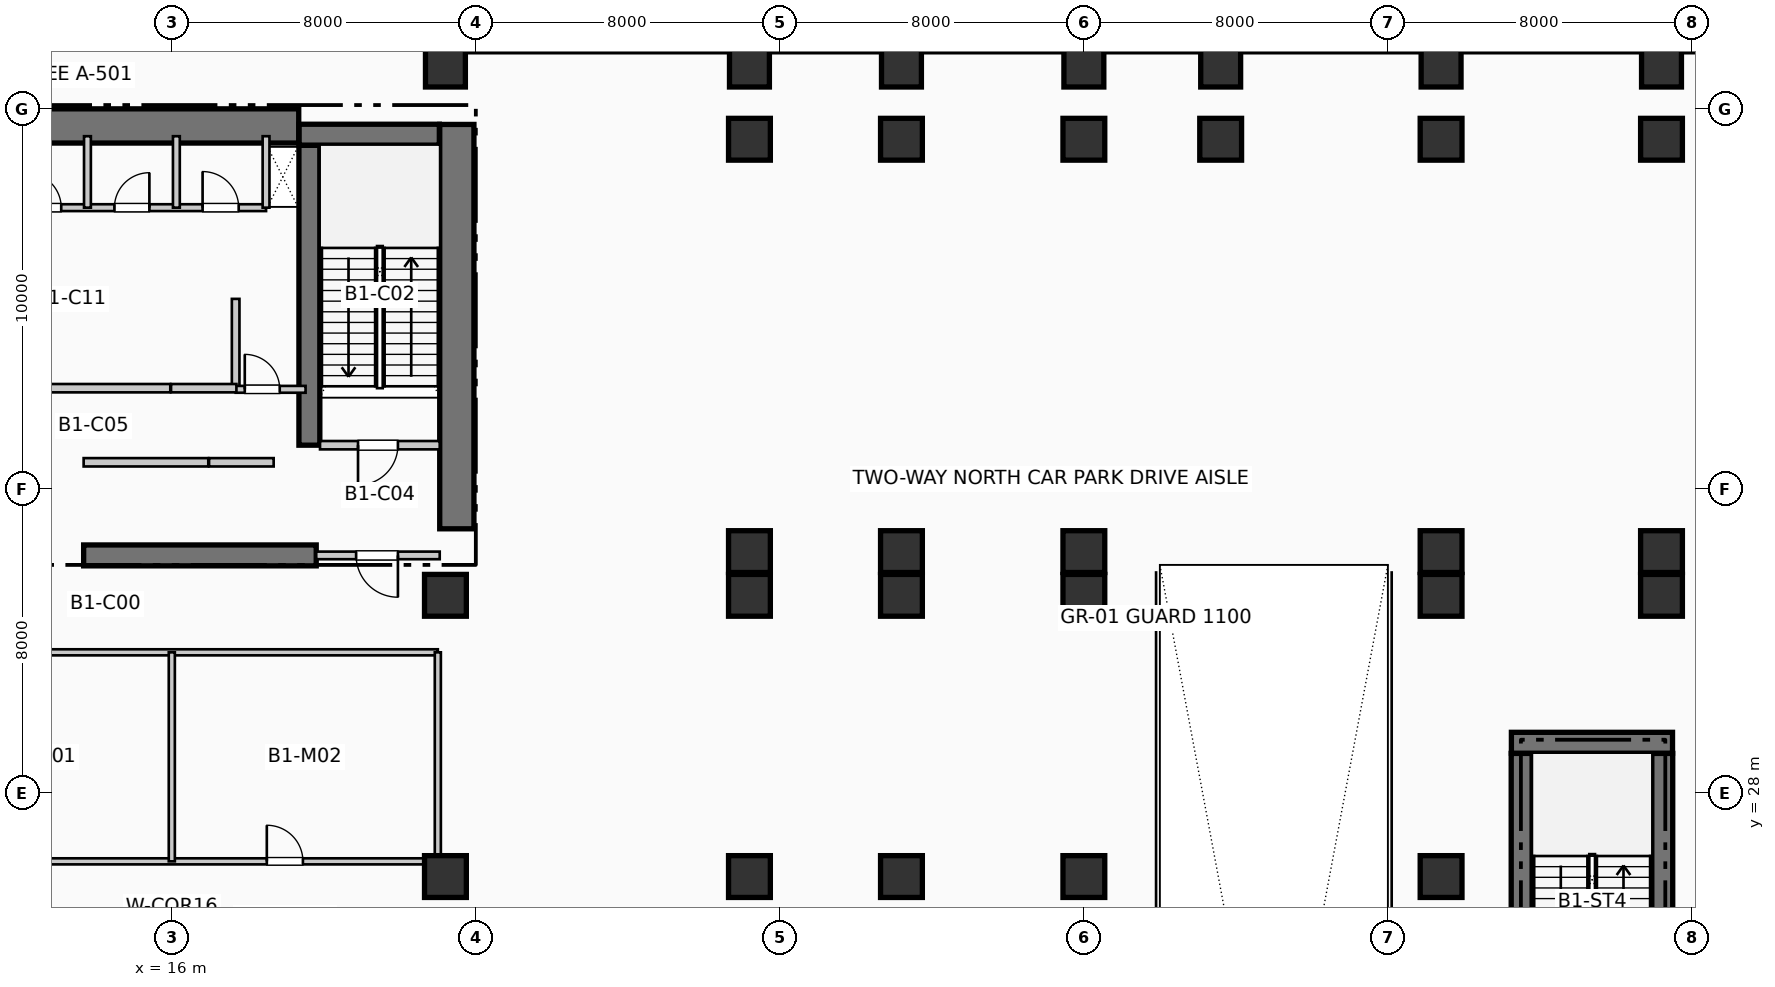
"""IFC4 building model, lengths in metres.
Left out: names, types, materials, properties, quantities, classifications, styles, units other than length and angle.
Written with IfcOpenShell. Run it as: python <this file> out.ifc"""

import sys

from ifc_helpers import new_model, si_unit, direction, frame, frame_2d, origin, origin_2d, place, context, subcontext, project, spatial, rectangle, extrude, element, fill, save


model = new_model("IFC4")
c1 = context("Model", 3, precision=1e-05, world=origin(), true_north=direction((0.0, 1.0)))
c2 = subcontext(c1, "Body", "Model", "MODEL_VIEW")
j1 = project(units=[si_unit("LENGTHUNIT", "METRE"), si_unit("PLANEANGLEUNIT", "RADIAN")], contexts=[c1])
p1 = place(None, origin())
s1 = spatial("IfcSite", under=j1, at=p1, CompositionType="ELEMENT")
p2 = place(p1, origin())
s2 = spatial("IfcBuilding", under=s1, at=p2, CompositionType="ELEMENT")
p3 = place(p2, frame((0.0, 0.0, -4.62)))
s3 = spatial("IfcBuildingStorey", under=s2, at=p3, CompositionType="ELEMENT", Elevation=-4.62)
p4 = place(p3, frame((5.36, 45.55, 0.0), z_axis=(0.0, 0.0, 1.0), x_axis=(1.0, 0.0, 0.0)))
e1 = element("IfcWall", 1, at=p4, inside=s3, PredefinedType="SHEAR", context=c2, shape_type="SweptSolid", body=[
    extrude(rectangle(XDim=13.98, YDim=0.9, at=frame_2d((6.99, 0.0))), origin(), (0.0, 0.0, 1.0), 4.62),
])
p5 = place(p3, frame((23.5, 34.95, 0.0), z_axis=(0.0, 0.0, 1.0), x_axis=(0.0, 1.0, 0.0)))
e2 = element("IfcWall", 2, at=p5, inside=s3, PredefinedType="SHEAR", context=c2, shape_type="SweptSolid", body=[
    extrude(rectangle(XDim=10.64, YDim=0.9, at=frame_2d((5.32, 0.0))), origin(), (0.0, 0.0, 1.0), 4.62),
])
p6 = place(p3, frame((13.68, 34.25, 0.0), z_axis=(0.0, 0.0, 1.0), x_axis=(1.0, 0.0, 0.0)))
e3 = element("IfcWall", 3, at=p6, inside=s3, PredefinedType="SHEAR", context=c2, shape_type="SweptSolid", body=[
    extrude(rectangle(XDim=6.12, YDim=0.55, at=frame_2d((3.06, 0.0))), origin(), (0.0, 0.0, 1.0), 4.62),
])
p7 = place(p3, frame((19.62, 37.15, 0.0), z_axis=(0.0, 0.0, 1.0), x_axis=(0.0, 1.0, 0.0)))
e4 = element("IfcWall", 4, at=p7, inside=s3, PredefinedType="SHEAR", context=c2, shape_type="SweptSolid", body=[
    extrude(rectangle(XDim=7.89, YDim=0.55, at=frame_2d((3.945, 0.0))), origin(), (0.0, 0.0, 1.0), 4.62),
])
p8 = place(p3, frame((19.35, 45.32, 0.0), z_axis=(0.0, 0.0, 1.0), x_axis=(1.0, 0.0, 0.0)))
e5 = element("IfcWall", 5, at=p8, inside=s3, PredefinedType="SHEAR", context=c2, shape_type="SweptSolid", body=[
    extrude(rectangle(XDim=3.69, YDim=0.55, at=frame_2d((1.845, 0.0))), origin(), (0.0, 0.0, 1.0), 4.62),
])
for number, where, z_axis, x_axis in (
    (6, (51.52, 21.15, 0.0), (0.0, 0.0, 1.0), (0.0, 1.0, 0.0)),
    (7, (55.22, 21.15, 0.0), (0.0, 0.0, 1.0), (0.0, 1.0, 0.0)),
):
    element("IfcWall", number, at=place(p3, frame(where, z_axis=z_axis, x_axis=x_axis)), inside=s3, PredefinedType="SHEAR", context=c2, shape_type="SweptSolid", body=[
        extrude(rectangle(XDim=7.89, YDim=0.55, at=frame_2d((3.945, 0.0))), origin(), (0.0, 0.0, 1.0), 4.62),
    ])
p9 = place(p3, frame((51.25, 29.32, 0.0), z_axis=(0.0, 0.0, 1.0), x_axis=(1.0, 0.0, 0.0)))
e8 = element("IfcWall", 8, at=p9, inside=s3, PredefinedType="SHEAR", context=c2, shape_type="SweptSolid", body=[
    extrude(rectangle(XDim=4.24, YDim=0.55, at=frame_2d((2.12, 0.0))), origin(), (0.0, 0.0, 1.0), 4.62),
])
for number, where, z_axis, x_axis in (
    (9, (23.2, 25.8, 0.0), (0.0, 0.0, 1.0), (1.0, 0.0, 0.0)),
    (10, (23.2, 33.2, 0.0), (0.0, 0.0, 1.0), (1.0, 0.0, 0.0)),
):
    element("IfcColumn", number, at=place(p3, frame(where, z_axis=z_axis, x_axis=x_axis)), inside=s3, PredefinedType="COLUMN", context=c2, shape_type="SweptSolid", body=[
        extrude(rectangle(XDim=1.1, YDim=1.1, at=origin_2d()), origin(), (0.0, 0.0, 1.0), 4.62),
    ])
p10 = place(p3, frame((23.2, 47.1, 0.0), z_axis=(0.0, 0.0, 1.0), x_axis=(1.0, 0.0, 0.0)))
e11 = element("IfcColumn", 11, at=p10, inside=s3, PredefinedType="COLUMN", context=c2, shape_type="SweptSolid", body=[
    extrude(rectangle(XDim=1.05, YDim=1.05, at=origin_2d()), origin(), (0.0, 0.0, 1.0), 4.62),
])
for number, where, z_axis, x_axis in (
    (12, (31.2, 25.8, 0.0), (0.0, 0.0, 1.0), (1.0, 0.0, 0.0)),
    (13, (31.2, 33.2, 0.0), (0.0, 0.0, 1.0), (1.0, 0.0, 0.0)),
    (14, (31.2, 34.35, 0.0), (0.0, 0.0, 1.0), (1.0, 0.0, 0.0)),
    (15, (31.2, 45.2, 0.0), (0.0, 0.0, 1.0), (1.0, 0.0, 0.0)),
):
    element("IfcColumn", number, at=place(p3, frame(where, z_axis=z_axis, x_axis=x_axis)), inside=s3, PredefinedType="COLUMN", context=c2, shape_type="SweptSolid", body=[
        extrude(rectangle(XDim=1.1, YDim=1.1, at=origin_2d()), origin(), (0.0, 0.0, 1.0), 4.62),
    ])
p11 = place(p3, frame((31.2, 47.1, 0.0), z_axis=(0.0, 0.0, 1.0), x_axis=(1.0, 0.0, 0.0)))
e16 = element("IfcColumn", 16, at=p11, inside=s3, PredefinedType="COLUMN", context=c2, shape_type="SweptSolid", body=[
    extrude(rectangle(XDim=1.05, YDim=1.05, at=origin_2d()), origin(), (0.0, 0.0, 1.0), 4.62),
])
for number, where, z_axis, x_axis in (
    (17, (35.2, 25.8, 0.0), (0.0, 0.0, 1.0), (1.0, 0.0, 0.0)),
    (18, (35.2, 33.2, 0.0), (0.0, 0.0, 1.0), (1.0, 0.0, 0.0)),
    (19, (35.2, 34.35, 0.0), (0.0, 0.0, 1.0), (1.0, 0.0, 0.0)),
    (20, (35.2, 45.2, 0.0), (0.0, 0.0, 1.0), (1.0, 0.0, 0.0)),
):
    element("IfcColumn", number, at=place(p3, frame(where, z_axis=z_axis, x_axis=x_axis)), inside=s3, PredefinedType="COLUMN", context=c2, shape_type="SweptSolid", body=[
        extrude(rectangle(XDim=1.1, YDim=1.1, at=origin_2d()), origin(), (0.0, 0.0, 1.0), 4.62),
    ])
p12 = place(p3, frame((35.2, 47.1, 0.0), z_axis=(0.0, 0.0, 1.0), x_axis=(1.0, 0.0, 0.0)))
e21 = element("IfcColumn", 21, at=p12, inside=s3, PredefinedType="COLUMN", context=c2, shape_type="SweptSolid", body=[
    extrude(rectangle(XDim=1.05, YDim=1.05, at=origin_2d()), origin(), (0.0, 0.0, 1.0), 4.62),
])
for number, where, z_axis, x_axis in (
    (22, (40.0, 25.8, 0.0), (0.0, 0.0, 1.0), (1.0, 0.0, 0.0)),
    (23, (40.0, 33.2, 0.0), (0.0, 0.0, 1.0), (1.0, 0.0, 0.0)),
    (24, (40.0, 34.35, 0.0), (0.0, 0.0, 1.0), (1.0, 0.0, 0.0)),
    (25, (40.0, 45.2, 0.0), (0.0, 0.0, 1.0), (1.0, 0.0, 0.0)),
):
    element("IfcColumn", number, at=place(p3, frame(where, z_axis=z_axis, x_axis=x_axis)), inside=s3, PredefinedType="COLUMN", context=c2, shape_type="SweptSolid", body=[
        extrude(rectangle(XDim=1.1, YDim=1.1, at=origin_2d()), origin(), (0.0, 0.0, 1.0), 4.62),
    ])
p13 = place(p3, frame((40.0, 47.1, 0.0), z_axis=(0.0, 0.0, 1.0), x_axis=(1.0, 0.0, 0.0)))
e26 = element("IfcColumn", 26, at=p13, inside=s3, PredefinedType="COLUMN", context=c2, shape_type="SweptSolid", body=[
    extrude(rectangle(XDim=1.05, YDim=1.05, at=origin_2d()), origin(), (0.0, 0.0, 1.0), 4.62),
])
p14 = place(p3, frame((43.6, 45.2, 0.0), z_axis=(0.0, 0.0, 1.0), x_axis=(1.0, 0.0, 0.0)))
e27 = element("IfcColumn", 27, at=p14, inside=s3, PredefinedType="COLUMN", context=c2, shape_type="SweptSolid", body=[
    extrude(rectangle(XDim=1.1, YDim=1.1, at=origin_2d()), origin(), (0.0, 0.0, 1.0), 4.62),
])
p15 = place(p3, frame((43.6, 47.1, 0.0), z_axis=(0.0, 0.0, 1.0), x_axis=(1.0, 0.0, 0.0)))
e28 = element("IfcColumn", 28, at=p15, inside=s3, PredefinedType="COLUMN", context=c2, shape_type="SweptSolid", body=[
    extrude(rectangle(XDim=1.05, YDim=1.05, at=origin_2d()), origin(), (0.0, 0.0, 1.0), 4.62),
])
for number, where, z_axis, x_axis in (
    (29, (49.4, 25.8, 0.0), (0.0, 0.0, 1.0), (1.0, 0.0, 0.0)),
    (30, (49.4, 33.2, 0.0), (0.0, 0.0, 1.0), (1.0, 0.0, 0.0)),
    (31, (49.4, 34.35, 0.0), (0.0, 0.0, 1.0), (1.0, 0.0, 0.0)),
    (32, (49.4, 45.2, 0.0), (0.0, 0.0, 1.0), (1.0, 0.0, 0.0)),
):
    element("IfcColumn", number, at=place(p3, frame(where, z_axis=z_axis, x_axis=x_axis)), inside=s3, PredefinedType="COLUMN", context=c2, shape_type="SweptSolid", body=[
        extrude(rectangle(XDim=1.1, YDim=1.1, at=origin_2d()), origin(), (0.0, 0.0, 1.0), 4.62),
    ])
p16 = place(p3, frame((49.4, 47.1, 0.0), z_axis=(0.0, 0.0, 1.0), x_axis=(1.0, 0.0, 0.0)))
e33 = element("IfcColumn", 33, at=p16, inside=s3, PredefinedType="COLUMN", context=c2, shape_type="SweptSolid", body=[
    extrude(rectangle(XDim=1.05, YDim=1.05, at=origin_2d()), origin(), (0.0, 0.0, 1.0), 4.62),
])
for number, where, z_axis, x_axis in (
    (34, (55.2, 33.2, 0.0), (0.0, 0.0, 1.0), (1.0, 0.0, 0.0)),
    (35, (55.2, 34.35, 0.0), (0.0, 0.0, 1.0), (1.0, 0.0, 0.0)),
    (36, (55.2, 45.2, 0.0), (0.0, 0.0, 1.0), (1.0, 0.0, 0.0)),
):
    element("IfcColumn", number, at=place(p3, frame(where, z_axis=z_axis, x_axis=x_axis)), inside=s3, PredefinedType="COLUMN", context=c2, shape_type="SweptSolid", body=[
        extrude(rectangle(XDim=1.1, YDim=1.1, at=origin_2d()), origin(), (0.0, 0.0, 1.0), 4.62),
    ])
p17 = place(p3, frame((55.2, 47.1, 0.0), z_axis=(0.0, 0.0, 1.0), x_axis=(1.0, 0.0, 0.0)))
e37 = element("IfcColumn", 37, at=p17, inside=s3, PredefinedType="COLUMN", context=c2, shape_type="SweptSolid", body=[
    extrude(rectangle(XDim=1.05, YDim=1.05, at=origin_2d()), origin(), (0.0, 0.0, 1.0), 4.62),
])
p18 = place(p3, frame((19.9, 37.15, 0.0), z_axis=(0.0, 0.0, 1.0), x_axis=(1.0, 0.0, 0.0)))
e38 = element("IfcWall", 38, at=p18, inside=s3, PredefinedType="PARTITIONING", context=c2, shape_type="SweptSolid", body=[
    extrude(rectangle(XDim=3.15, YDim=0.22, at=frame_2d((1.575, 0.0))), origin(), (0.0, 0.0, 1.0), 4.3),
])
p19 = place(p18, frame((2.05, 0.0, 0.0), z_axis=(0.0, 0.0, 1.0), x_axis=(-1.0, 0.0, 0.0)))
e39 = element("IfcOpeningElement", 39, at=p19, cuts=e38, PredefinedType="OPENING", context=c2, shape_type="SweptSolid", body=[
    extrude(rectangle(XDim=1.05, YDim=2.15, at=frame_2d((0.525, 1.075))), frame((0.0, 0.12, 0.0), z_axis=(0.0, -1.0, 0.0), x_axis=(1.0, 0.0, 0.0)), (0.0, 0.0, 1.0), 0.24),
])
p20 = place(p3, frame((19.8, 34.25, 0.0), z_axis=(0.0, 0.0, 1.0), x_axis=(1.0, 0.0, 0.0)))
e40 = element("IfcWall", 40, at=p20, inside=s3, PredefinedType="PARTITIONING", context=c2, shape_type="SweptSolid", body=[
    extrude(rectangle(XDim=3.25, YDim=0.2, at=frame_2d((1.625, 0.0))), origin(), (0.0, 0.0, 1.0), 4.3),
])
p21 = place(p20, frame((2.15, 0.0, 0.0), z_axis=(0.0, 0.0, 1.0), x_axis=(-1.0, 0.0, 0.0)))
e41 = element("IfcOpeningElement", 41, at=p21, cuts=e40, PredefinedType="OPENING", context=c2, shape_type="SweptSolid", body=[
    extrude(rectangle(XDim=1.1, YDim=2.15, at=frame_2d((0.55, 1.075))), frame((0.0, 0.11, 0.0), z_axis=(0.0, -1.0, 0.0), x_axis=(1.0, 0.0, 0.0)), (0.0, 0.0, 1.0), 0.22),
])
p22 = place(p3, frame((17.68, 38.65, 0.0), z_axis=(0.0, 0.0, 1.0), x_axis=(0.0, 1.0, 0.0)))
e42 = element("IfcWall", 42, at=p22, inside=s3, PredefinedType="PARTITIONING", context=c2, shape_type="SweptSolid", body=[
    extrude(rectangle(XDim=2.35, YDim=0.2, at=frame_2d((1.175, 0.0))), origin(), (0.0, 0.0, 1.0), 4.3),
])
p23 = place(p3, frame((17.68, 38.62, 0.0), z_axis=(0.0, 0.0, 1.0), x_axis=(1.0, 0.0, 0.0)))
e43 = element("IfcWall", 43, at=p23, inside=s3, PredefinedType="PARTITIONING", context=c2, shape_type="SweptSolid", body=[
    extrude(rectangle(XDim=1.84, YDim=0.18, at=frame_2d((0.92, 0.0))), origin(), (0.0, 0.0, 1.0), 4.3),
])
p24 = place(p23, frame((0.24, 0.0, 0.0)))
e44 = element("IfcOpeningElement", 44, at=p24, cuts=e43, PredefinedType="OPENING", context=c2, shape_type="SweptSolid", body=[
    extrude(rectangle(XDim=0.92, YDim=2.1, at=frame_2d((0.46, 1.05))), frame((0.0, 0.1, 0.0), z_axis=(0.0, -1.0, 0.0), x_axis=(1.0, 0.0, 0.0)), (0.0, 0.0, 1.0), 0.2),
])
p25 = place(p3, frame((13.68, 36.7, 0.0), z_axis=(0.0, 0.0, 1.0), x_axis=(1.0, 0.0, 0.0)))
e45 = element("IfcWall", 45, at=p25, inside=s3, PredefinedType="PARTITIONING", context=c2, shape_type="SweptSolid", body=[
    extrude(rectangle(XDim=3.28, YDim=0.22, at=frame_2d((1.64, 0.0))), origin(), (0.0, 0.0, 1.0), 4.3),
])
p26 = place(p3, frame((12.58, 38.65, 0.0), z_axis=(0.0, 0.0, 1.0), x_axis=(1.0, 0.0, 0.0)))
e46 = element("IfcWall", 46, at=p26, inside=s3, PredefinedType="PARTITIONING", context=c2, shape_type="SweptSolid", body=[
    extrude(rectangle(XDim=3.38, YDim=0.22, at=frame_2d((1.69, 0.0))), origin(), (0.0, 0.0, 1.0), 4.3),
])
p27 = place(p3, frame((16.98, 36.7, 0.0), z_axis=(0.0, 0.0, 1.0), x_axis=(1.0, 0.0, 0.0)))
e47 = element("IfcWall", 47, at=p27, inside=s3, PredefinedType="PARTITIONING", context=c2, shape_type="SweptSolid", body=[
    extrude(rectangle(XDim=1.7, YDim=0.22, at=frame_2d((0.85, 0.0))), origin(), (0.0, 0.0, 1.0), 4.3),
])
p28 = place(p3, frame((15.98, 38.65, 0.0), z_axis=(0.0, 0.0, 1.0), x_axis=(1.0, 0.0, 0.0)))
e48 = element("IfcWall", 48, at=p28, inside=s3, PredefinedType="PARTITIONING", context=c2, shape_type="SweptSolid", body=[
    extrude(rectangle(XDim=1.72, YDim=0.22, at=frame_2d((0.86, 0.0))), origin(), (0.0, 0.0, 1.0), 4.3),
])
p29 = place(p3, frame((9.15, 43.4, 0.0), z_axis=(0.0, 0.0, 1.0), x_axis=(1.0, 0.0, 0.0)))
e49 = element("IfcWall", 49, at=p29, inside=s3, PredefinedType="PLUMBINGWALL", context=c2, shape_type="SweptSolid", body=[
    extrude(rectangle(XDim=9.33, YDim=0.18, at=frame_2d((4.665, 0.0))), origin(), (0.0, 0.0, 1.0), 4.3),
])
p30 = place(p29, frame((0.72, 0.0, 0.0)))
e50 = element("IfcOpeningElement", 50, at=p30, cuts=e49, PredefinedType="OPENING", context=c2, shape_type="SweptSolid", body=[
    extrude(rectangle(XDim=0.92, YDim=2.1, at=frame_2d((0.46, 1.05))), frame((0.0, 0.1, 0.0), z_axis=(0.0, -1.0, 0.0), x_axis=(1.0, 0.0, 0.0)), (0.0, 0.0, 1.0), 0.2),
])
p31 = place(p29, frame((3.02, 0.0, 0.0)))
e51 = element("IfcOpeningElement", 51, at=p31, cuts=e49, PredefinedType="OPENING", context=c2, shape_type="SweptSolid", body=[
    extrude(rectangle(XDim=0.92, YDim=2.1, at=frame_2d((0.46, 1.05))), frame((0.0, 0.1, 0.0), z_axis=(0.0, -1.0, 0.0), x_axis=(1.0, 0.0, 0.0)), (0.0, 0.0, 1.0), 0.2),
])
p32 = place(p29, frame((5.34, 0.0, 0.0)))
e52 = element("IfcOpeningElement", 52, at=p32, cuts=e49, PredefinedType="OPENING", context=c2, shape_type="SweptSolid", body=[
    extrude(rectangle(XDim=0.92, YDim=2.1, at=frame_2d((0.46, 1.05))), frame((0.0, 0.1, 0.0), z_axis=(0.0, -1.0, 0.0), x_axis=(1.0, 0.0, 0.0)), (0.0, 0.0, 1.0), 0.2),
])
p33 = place(p29, frame((7.66, 0.0, 0.0)))
e53 = element("IfcOpeningElement", 53, at=p33, cuts=e49, PredefinedType="OPENING", context=c2, shape_type="SweptSolid", body=[
    extrude(rectangle(XDim=0.95, YDim=2.1, at=frame_2d((0.475, 1.05))), frame((0.0, 0.1, 0.0), z_axis=(0.0, -1.0, 0.0), x_axis=(1.0, 0.0, 0.0)), (0.0, 0.0, 1.0), 0.2),
])
for number, where, z_axis, x_axis in (
    (54, (18.48, 43.4, 0.0), (0.0, 0.0, 1.0), (0.0, 1.0, 0.0)),
    (55, (13.78, 43.4, 0.0), (0.0, 0.0, 1.0), (0.0, 1.0, 0.0)),
    (56, (16.12, 43.4, 0.0), (0.0, 0.0, 1.0), (0.0, 1.0, 0.0)),
):
    element("IfcWall", number, at=place(p3, frame(where, z_axis=z_axis, x_axis=x_axis)), inside=s3, PredefinedType="PLUMBINGWALL", context=c2, shape_type="SweptSolid", body=[
        extrude(rectangle(XDim=1.88, YDim=0.18, at=frame_2d((0.94, 0.0))), origin(), (0.0, 0.0, 1.0), 4.3),
    ])
p34 = place(p3, frame((9.0, 26.2, 0.0), z_axis=(0.0, 0.0, 1.0), x_axis=(1.0, 0.0, 0.0)))
e57 = element("IfcWall", 57, at=p34, inside=s3, PredefinedType="PARTITIONING", context=c2, shape_type="SweptSolid", body=[
    extrude(rectangle(XDim=14.0, YDim=0.16, at=frame_2d((7.0, 0.0))), origin(), (0.0, 0.0, 1.0), 3.485),
])
p35 = place(p34, frame((1.0, 0.0, 0.0)))
e58 = element("IfcOpeningElement", 58, at=p35, cuts=e57, PredefinedType="OPENING", context=c2, shape_type="SweptSolid", body=[
    extrude(rectangle(XDim=0.95, YDim=2.1, at=frame_2d((0.475, 1.05))), frame((0.0, 0.09, 0.0), z_axis=(0.0, -1.0, 0.0), x_axis=(1.0, 0.0, 0.0)), (0.0, 0.0, 1.0), 0.18),
])
p36 = place(p34, frame((9.5, 0.0, 0.0)))
e59 = element("IfcOpeningElement", 59, at=p36, cuts=e57, PredefinedType="OPENING", context=c2, shape_type="SweptSolid", body=[
    extrude(rectangle(XDim=0.95, YDim=2.1, at=frame_2d((0.475, 1.05))), frame((0.0, 0.09, 0.0), z_axis=(0.0, -1.0, 0.0), x_axis=(1.0, 0.0, 0.0)), (0.0, 0.0, 1.0), 0.18),
])
p37 = place(p3, frame((9.0, 31.7, 0.0), z_axis=(0.0, 0.0, 1.0), x_axis=(1.0, 0.0, 0.0)))
e60 = element("IfcWall", 60, at=p37, inside=s3, PredefinedType="PARTITIONING", context=c2, shape_type="SweptSolid", body=[
    extrude(rectangle(XDim=14.0, YDim=0.16, at=frame_2d((7.0, 0.0))), origin(), (0.0, 0.0, 1.0), 4.3),
])
p38 = place(p3, frame((23.0, 26.2, 0.0), z_axis=(0.0, 0.0, 1.0), x_axis=(0.0, 1.0, 0.0)))
e61 = element("IfcWall", 61, at=p38, inside=s3, PredefinedType="PARTITIONING", context=c2, shape_type="SweptSolid", body=[
    extrude(rectangle(XDim=5.5, YDim=0.16, at=frame_2d((2.75, 0.0))), origin(), (0.0, 0.0, 1.0), 3.485),
])
p39 = place(p3, frame((16.0, 26.2, 0.0), z_axis=(0.0, 0.0, 1.0), x_axis=(0.0, 1.0, 0.0)))
e62 = element("IfcWall", 62, at=p39, inside=s3, PredefinedType="PARTITIONING", context=c2, shape_type="SweptSolid", body=[
    extrude(rectangle(XDim=5.5, YDim=0.16, at=frame_2d((2.75, 0.0))), origin(), (0.0, 0.0, 1.0), 4.3),
])
p40 = place(p19, origin())
e63 = element("IfcDoor", 63, at=p40, inside=s3, OperationType="SINGLE_SWING_LEFT", PredefinedType="DOOR", context=c2, shape_type="SweptSolid", body=[
    extrude(rectangle(XDim=1.05, YDim=2.15, at=frame_2d((0.525, 1.075))), frame((0.0, 0.025, 0.0), z_axis=(0.0, -1.0, 0.0), x_axis=(1.0, 0.0, 0.0)), (0.0, 0.0, 1.0), 0.05),
])
fill(e39, e63)
p41 = place(p21, origin())
e64 = element("IfcDoor", 64, at=p41, inside=s3, OperationType="SINGLE_SWING_RIGHT", PredefinedType="DOOR", context=c2, shape_type="SweptSolid", body=[
    extrude(rectangle(XDim=1.1, YDim=2.15, at=frame_2d((0.55, 1.075))), frame((0.0, 0.025, 0.0), z_axis=(0.0, -1.0, 0.0), x_axis=(1.0, 0.0, 0.0)), (0.0, 0.0, 1.0), 0.05),
])
fill(e41, e64)
p42 = place(p24, origin())
e65 = element("IfcDoor", 65, at=p42, inside=s3, OperationType="SINGLE_SWING_LEFT", PredefinedType="DOOR", context=c2, shape_type="SweptSolid", body=[
    extrude(rectangle(XDim=0.92, YDim=2.1, at=frame_2d((0.46, 1.05))), frame((0.0, 0.025, 0.0), z_axis=(0.0, -1.0, 0.0), x_axis=(1.0, 0.0, 0.0)), (0.0, 0.0, 1.0), 0.05),
])
fill(e44, e65)
p43 = place(p31, origin())
e66 = element("IfcDoor", 66, at=p43, inside=s3, OperationType="SINGLE_SWING_LEFT", PredefinedType="DOOR", context=c2, shape_type="SweptSolid", body=[
    extrude(rectangle(XDim=0.92, YDim=2.1, at=frame_2d((0.46, 1.05))), frame((0.0, 0.025, 0.0), z_axis=(0.0, -1.0, 0.0), x_axis=(1.0, 0.0, 0.0)), (0.0, 0.0, 1.0), 0.05),
])
fill(e51, e66)
p44 = place(p32, origin())
e67 = element("IfcDoor", 67, at=p44, inside=s3, OperationType="SINGLE_SWING_RIGHT", PredefinedType="DOOR", context=c2, shape_type="SweptSolid", body=[
    extrude(rectangle(XDim=0.92, YDim=2.1, at=frame_2d((0.46, 1.05))), frame((0.0, 0.025, 0.0), z_axis=(0.0, -1.0, 0.0), x_axis=(1.0, 0.0, 0.0)), (0.0, 0.0, 1.0), 0.05),
])
fill(e52, e67)
p45 = place(p33, origin())
e68 = element("IfcDoor", 68, at=p45, inside=s3, OperationType="SINGLE_SWING_LEFT", PredefinedType="DOOR", context=c2, shape_type="SweptSolid", body=[
    extrude(rectangle(XDim=0.95, YDim=2.1, at=frame_2d((0.475, 1.05))), frame((0.0, 0.025, 0.0), z_axis=(0.0, -1.0, 0.0), x_axis=(1.0, 0.0, 0.0)), (0.0, 0.0, 1.0), 0.05),
])
fill(e53, e68)
p46 = place(p36, origin())
e69 = element("IfcDoor", 69, at=p46, inside=s3, OperationType="SINGLE_SWING_LEFT", PredefinedType="DOOR", context=c2, shape_type="SweptSolid", body=[
    extrude(rectangle(XDim=0.95, YDim=2.1, at=frame_2d((0.475, 1.05))), frame((0.0, 0.025, 0.0), z_axis=(0.0, -1.0, 0.0), x_axis=(1.0, 0.0, 0.0)), (0.0, 0.0, 1.0), 0.05),
])
fill(e59, e69)
save(model, sys.argv[1])
